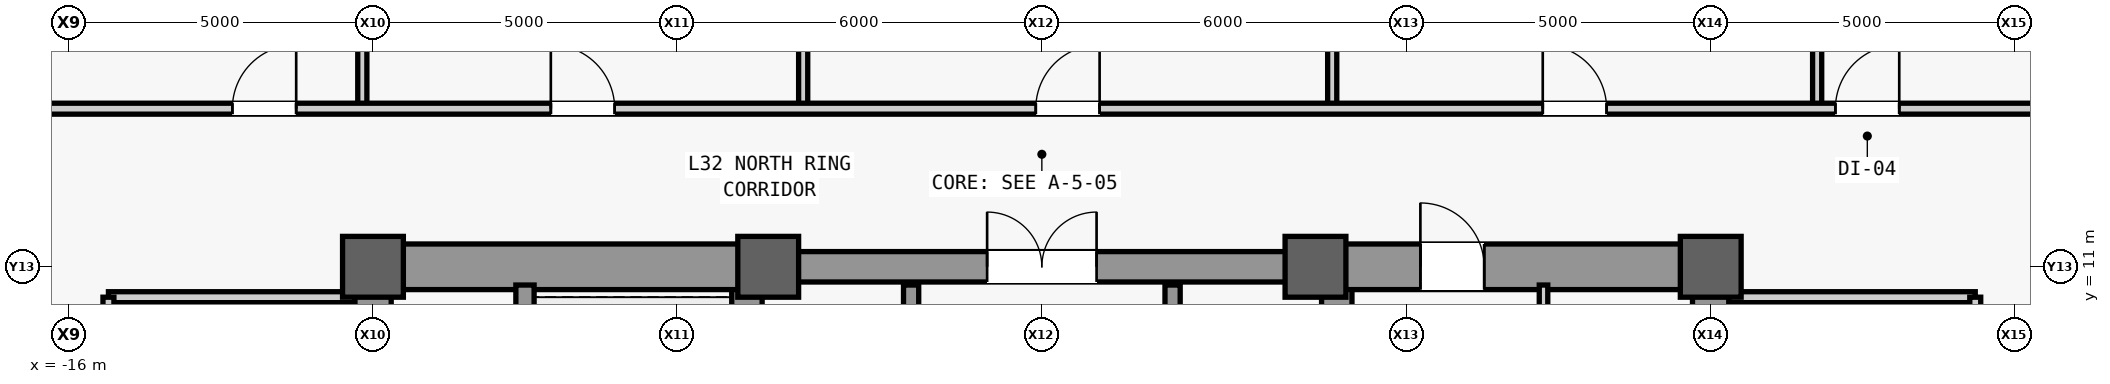
"""IFC4 building model, lengths in metres.
Left out: names, types, materials, properties, quantities, classifications, styles, units other than length and angle.
Written with IfcOpenShell. Run it as: python <this file> out.ifc"""

import sys

from ifc_helpers import new_model, si_unit, direction, frame, frame_2d, origin, origin_2d, place, context, subcontext, project, spatial, rectangle, extrude, source, transform, mapped, element, fill, save


model = new_model("IFC4")
c1 = context("Model", 3, precision=1e-05, world=origin(), true_north=direction((0.0, 1.0)))
c2 = subcontext(c1, "Body", "Model", "MODEL_VIEW")
j1 = project(units=[si_unit("LENGTHUNIT", "METRE"), si_unit("PLANEANGLEUNIT", "RADIAN")], contexts=[c1])
p1 = place(None, origin())
s1 = spatial("IfcSite", under=j1, at=p1, CompositionType="ELEMENT")
p2 = place(p1, origin())
s2 = spatial("IfcBuilding", under=s1, at=p2, CompositionType="ELEMENT")
p3 = place(p2, frame((0.0, 0.0, 140.6)))
s3 = spatial("IfcBuildingStorey", under=s2, at=p3, CompositionType="ELEMENT", Elevation=140.6)
m1 = source(origin(), c2, "Body", "SweptSolid", [
    extrude(rectangle(XDim=22.0, YDim=0.6, at=frame_2d((11.0, 0.0))), origin(), (0.0, 0.0, 1.0), 3.84),
])
p4 = place(p3, frame((-11.0, -11.0, 0.0), z_axis=(0.0, 0.0, 1.0), x_axis=(0.0, 1.0, 0.0)))
e1 = element("IfcWall", 1, at=p4, inside=s3, PredefinedType="SHEAR", context=c2, shape_type="MappedRepresentation", body=[
    mapped(m1, transform((0.0, 0.0, 0.0), scale=1.0)),
])
m2 = source(origin(), c2, "Body", "SweptSolid", [
    extrude(rectangle(XDim=1.1, YDim=2.2, at=frame_2d((0.55, 1.1))), frame((0.0, 0.31, 0.0), z_axis=(0.0, -1.0, 0.0), x_axis=(1.0, 0.0, 0.0)), (0.0, 0.0, 1.0), 0.62),
])
p5 = place(p4, frame((0.8, 0.0, 0.0)))
e2 = element("IfcOpeningElement", 2, at=p5, cuts=e1, PredefinedType="OPENING", context=c2, shape_type="MappedRepresentation", body=[
    mapped(m2, transform((0.0, 0.0, 0.0), scale=1.0)),
])
p6 = place(p4, frame((12.5, 0.0, 0.0)))
e3 = element("IfcOpeningElement", 3, at=p6, cuts=e1, PredefinedType="OPENING", context=c2, shape_type="MappedRepresentation", body=[
    mapped(m2, transform((0.0, 0.0, 0.0), scale=1.0)),
])
m3 = source(origin(), c2, "Body", "SweptSolid", [
    extrude(rectangle(XDim=0.9, YDim=2.15, at=frame_2d((0.45, 1.075))), frame((0.0, 0.31, 0.0), z_axis=(0.0, -1.0, 0.0), x_axis=(1.0, 0.0, 0.0)), (0.0, 0.0, 1.0), 0.62),
])
p7 = place(p4, frame((6.2, 0.0, 0.0)))
e4 = element("IfcOpeningElement", 4, at=p7, cuts=e1, PredefinedType="OPENING", context=c2, shape_type="MappedRepresentation", body=[
    mapped(m3, transform((0.0, 0.0, 0.0), scale=1.0)),
])
p8 = place(p4, frame((8.05, 0.0, 0.0)))
e5 = element("IfcOpeningElement", 5, at=p8, cuts=e1, PredefinedType="OPENING", context=c2, shape_type="MappedRepresentation", body=[
    mapped(m3, transform((0.0, 0.0, 0.0), scale=1.0)),
])
m4 = source(origin(), c2, "Body", "SweptSolid", [
    extrude(rectangle(XDim=1.3, YDim=2.3, at=frame_2d((0.65, 1.15))), frame((0.0, 0.31, 0.0), z_axis=(0.0, -1.0, 0.0), x_axis=(1.0, 0.0, 0.0)), (0.0, 0.0, 1.0), 0.62),
])
p9 = place(p4, frame((2.7, 0.0, 0.0)))
e6 = element("IfcOpeningElement", 6, at=p9, cuts=e1, PredefinedType="OPENING", context=c2, shape_type="MappedRepresentation", body=[
    mapped(m4, transform((0.0, 0.0, 0.0), scale=1.0)),
])
p10 = place(p3, frame((11.0, -11.0, 0.0), z_axis=(0.0, 0.0, 1.0), x_axis=(0.0, 1.0, 0.0)))
e7 = element("IfcWall", 7, at=p10, inside=s3, PredefinedType="SHEAR", context=c2, shape_type="MappedRepresentation", body=[
    mapped(m1, transform((0.0, 0.0, 0.0), scale=1.0)),
])
p11 = place(p10, frame((0.8, 0.0, 0.0)))
e8 = element("IfcOpeningElement", 8, at=p11, cuts=e7, PredefinedType="OPENING", context=c2, shape_type="MappedRepresentation", body=[
    mapped(m2, transform((0.0, 0.0, 0.0), scale=1.0)),
])
p12 = place(p10, frame((6.85, 0.0, 0.0)))
e9 = element("IfcOpeningElement", 9, at=p12, cuts=e7, PredefinedType="OPENING", context=c2, shape_type="MappedRepresentation", body=[
    mapped(m3, transform((0.0, 0.0, 0.0), scale=1.0)),
])
p13 = place(p10, frame((2.7, 0.0, 0.0)))
e10 = element("IfcOpeningElement", 10, at=p13, cuts=e7, PredefinedType="OPENING", context=c2, shape_type="MappedRepresentation", body=[
    mapped(m4, transform((0.0, 0.0, 0.0), scale=1.0)),
])
p14 = place(p10, frame((13.35, 0.0, 0.0)))
e11 = element("IfcOpeningElement", 11, at=p14, cuts=e7, PredefinedType="OPENING", context=c2, shape_type="MappedRepresentation", body=[
    mapped(m4, transform((0.0, 0.0, 0.0), scale=1.0)),
])
m5 = source(origin(), c2, "Body", "SweptSolid", [
    extrude(rectangle(XDim=21.4, YDim=0.5, at=frame_2d((10.7, 0.0))), origin(), (0.0, 0.0, 1.0), 3.84),
])
for number, where, z_axis, x_axis in (
    (12, (-4.85, -10.7, 0.0), (0.0, 0.0, 1.0), (0.0, 1.0, 0.0)),
    (13, (4.85, -10.7, 0.0), (0.0, 0.0, 1.0), (0.0, 1.0, 0.0)),
):
    element("IfcWall", number, at=place(p3, frame(where, z_axis=z_axis, x_axis=x_axis)), inside=s3, PredefinedType="SHEAR", context=c2, shape_type="MappedRepresentation", body=[
        mapped(m5, transform((0.0, 0.0, 0.0), scale=1.0)),
    ])
m6 = source(origin(), c2, "Body", "SweptSolid", [
    extrude(rectangle(XDim=5.85, YDim=0.75, at=frame_2d((2.925, 0.0))), origin(), (0.0, 0.0, 1.0), 3.84),
])
p15 = place(p3, frame((-10.7, 11.0, 0.0), z_axis=(0.0, 0.0, 1.0), x_axis=(1.0, 0.0, 0.0)))
e14 = element("IfcWall", 14, at=p15, inside=s3, PredefinedType="SHEAR", context=c2, shape_type="MappedRepresentation", body=[
    mapped(m6, transform((0.0, 0.0, 0.0), scale=1.0)),
])
p16 = place(p3, frame((4.85, 11.0, 0.0), z_axis=(0.0, 0.0, 1.0), x_axis=(1.0, 0.0, 0.0)))
e15 = element("IfcWall", 15, at=p16, inside=s3, PredefinedType="SHEAR", context=c2, shape_type="MappedRepresentation", body=[
    mapped(m6, transform((0.0, 0.0, 0.0), scale=1.0)),
])
m7 = source(origin(), c2, "Body", "SweptSolid", [
    extrude(rectangle(XDim=1.05, YDim=2.2, at=frame_2d((0.525, 1.1))), frame((0.0, 0.385, 0.0), z_axis=(0.0, -1.0, 0.0), x_axis=(1.0, 0.0, 0.0)), (0.0, 0.0, 1.0), 0.77),
])
p17 = place(p16, frame((1.375, 0.0, 0.0)))
e16 = element("IfcOpeningElement", 16, at=p17, cuts=e15, PredefinedType="OPENING", context=c2, shape_type="MappedRepresentation", body=[
    mapped(m7, transform((0.0, 0.0, 0.0), scale=1.0)),
])
m8 = source(origin(), c2, "Body", "SweptSolid", [
    extrude(rectangle(XDim=9.2, YDim=0.5, at=frame_2d((4.6, 0.0))), origin(), (0.0, 0.0, 1.0), 3.84),
])
p18 = place(p3, frame((-4.6, 11.0, 0.0), z_axis=(0.0, 0.0, 1.0), x_axis=(1.0, 0.0, 0.0)))
e17 = element("IfcWall", 17, at=p18, inside=s3, PredefinedType="SHEAR", context=c2, shape_type="MappedRepresentation", body=[
    mapped(m8, transform((0.0, 0.0, 0.0), scale=1.0)),
])
m9 = source(origin(), c2, "Body", "SweptSolid", [
    extrude(rectangle(XDim=1.8, YDim=2.25, at=frame_2d((0.9, 1.125))), frame((0.0, 0.26, 0.0), z_axis=(0.0, -1.0, 0.0), x_axis=(1.0, 0.0, 0.0)), (0.0, 0.0, 1.0), 0.52),
])
p19 = place(p18, frame((3.7, 0.0, 0.0)))
e18 = element("IfcOpeningElement", 18, at=p19, cuts=e17, PredefinedType="OPENING", context=c2, shape_type="MappedRepresentation", body=[
    mapped(m9, transform((0.0, 0.0, 0.0), scale=1.0)),
])
m10 = source(origin(), c2, "Body", "SweptSolid", [
    extrude(rectangle(XDim=1.0, YDim=1.0, at=origin_2d()), origin(), (0.0, 0.0, 1.0), 4.1),
])
for number, where, z_axis, x_axis in (
    (19, (-11.0, 11.0, 0.0), (0.0, 0.0, 1.0), (1.0, 0.0, 0.0)),
    (20, (-4.5, 11.0, 0.0), (0.0, 0.0, 1.0), (1.0, 0.0, 0.0)),
    (21, (4.5, 11.0, 0.0), (0.0, 0.0, 1.0), (1.0, 0.0, 0.0)),
    (22, (11.0, 11.0, 0.0), (0.0, 0.0, 1.0), (1.0, 0.0, 0.0)),
):
    element("IfcColumn", number, at=place(p3, frame(where, z_axis=z_axis, x_axis=x_axis)), inside=s3, PredefinedType="COLUMN", context=c2, shape_type="MappedRepresentation", body=[
        mapped(m10, transform((0.0, 0.0, 0.0), scale=1.0)),
    ])
m11 = source(origin(), c2, "Body", "SweptSolid", [
    extrude(rectangle(XDim=7.75, YDim=0.3, at=frame_2d((3.875, 0.0))), origin(), (0.0, 0.0, 1.0), 3.84),
])
p20 = place(p3, frame((-8.5, 2.95, 0.0), z_axis=(0.0, 0.0, 1.0), x_axis=(0.0, 1.0, 0.0)))
e23 = element("IfcWall", 23, at=p20, inside=s3, PredefinedType="SHEAR", context=c2, shape_type="MappedRepresentation", body=[
    mapped(m11, transform((0.0, 0.0, 0.0), scale=1.0)),
])
m12 = source(origin(), c2, "Body", "SweptSolid", [
    extrude(rectangle(XDim=9.4, YDim=0.14, at=frame_2d((4.7, 0.0))), origin(), (0.0, 0.0, 1.0), 3.84),
])
p21 = place(p3, frame((8.25, 1.3, 0.0), z_axis=(0.0, 0.0, 1.0), x_axis=(0.0, 1.0, 0.0)))
e24 = element("IfcWall", 24, at=p21, inside=s3, PredefinedType="PARTITIONING", context=c2, shape_type="MappedRepresentation", body=[
    mapped(m12, transform((0.0, 0.0, 0.0), scale=1.0)),
])
m13 = source(origin(), c2, "Body", "SweptSolid", [
    extrude(rectangle(XDim=4.05, YDim=0.18, at=frame_2d((2.025, 0.0))), origin(), (0.0, 0.0, 1.0), 3.84),
])
p22 = place(p3, frame((-15.35, 10.5, 0.0), z_axis=(0.0, 0.0, 1.0), x_axis=(1.0, 0.0, 0.0)))
e25 = element("IfcWall", 25, at=p22, inside=s3, PredefinedType="PARTITIONING", context=c2, shape_type="MappedRepresentation", body=[
    mapped(m13, transform((0.0, 0.0, 0.0), scale=1.0)),
])
m14 = source(origin(), c2, "Body", "SweptSolid", [
    extrude(rectangle(XDim=16.6, YDim=0.18, at=frame_2d((8.3, 0.0))), origin(), (0.0, 0.0, 1.0), 3.84),
])
p23 = place(p3, frame((-15.35, -6.1, 0.0), z_axis=(0.0, 0.0, 1.0), x_axis=(0.0, 1.0, 0.0)))
e26 = element("IfcWall", 26, at=p23, inside=s3, PredefinedType="PARTITIONING", context=c2, shape_type="MappedRepresentation", body=[
    mapped(m14, transform((0.0, 0.0, 0.0), scale=1.0)),
])
m15 = source(origin(), c2, "Body", "SweptSolid", [
    extrude(rectangle(XDim=1.8, YDim=2.25, at=frame_2d((0.9, 1.125))), frame((0.0, 0.1, 0.0), z_axis=(0.0, -1.0, 0.0), x_axis=(1.0, 0.0, 0.0)), (0.0, 0.0, 1.0), 0.2),
])
p24 = place(p23, frame((2.7, 0.0, 0.0)))
e27 = element("IfcOpeningElement", 27, at=p24, cuts=e26, PredefinedType="OPENING", context=c2, shape_type="MappedRepresentation", body=[
    mapped(m15, transform((0.0, 0.0, 0.0), scale=1.0)),
])
p25 = place(p23, frame((11.0, 0.0, 0.0)))
e28 = element("IfcOpeningElement", 28, at=p25, cuts=e26, PredefinedType="OPENING", context=c2, shape_type="MappedRepresentation", body=[
    mapped(m15, transform((0.0, 0.0, 0.0), scale=1.0)),
])
p26 = place(p3, frame((11.3, 10.5, 0.0), z_axis=(0.0, 0.0, 1.0), x_axis=(1.0, 0.0, 0.0)))
e29 = element("IfcWall", 29, at=p26, inside=s3, PredefinedType="PARTITIONING", context=c2, shape_type="MappedRepresentation", body=[
    mapped(m13, transform((0.0, 0.0, 0.0), scale=1.0)),
])
p27 = place(p3, frame((15.35, -6.1, 0.0), z_axis=(0.0, 0.0, 1.0), x_axis=(0.0, 1.0, 0.0)))
e30 = element("IfcWall", 30, at=p27, inside=s3, PredefinedType="PARTITIONING", context=c2, shape_type="MappedRepresentation", body=[
    mapped(m14, transform((0.0, 0.0, 0.0), scale=1.0)),
])
p28 = place(p27, frame((2.7, 0.0, 0.0)))
e31 = element("IfcOpeningElement", 31, at=p28, cuts=e30, PredefinedType="OPENING", context=c2, shape_type="MappedRepresentation", body=[
    mapped(m15, transform((0.0, 0.0, 0.0), scale=1.0)),
])
p29 = place(p27, frame((13.0, 0.0, 0.0)))
e32 = element("IfcOpeningElement", 32, at=p29, cuts=e30, PredefinedType="OPENING", context=c2, shape_type="MappedRepresentation", body=[
    mapped(m15, transform((0.0, 0.0, 0.0), scale=1.0)),
])
m16 = source(origin(), c2, "Body", "SweptSolid", [
    extrude(rectangle(XDim=5.4, YDim=0.25, at=frame_2d((2.7, 0.0))), origin(), (0.0, 0.0, 1.0), 3.84),
])
for number, where, z_axis, x_axis in (
    (33, (-2.15, 5.3, 0.0), (0.0, 0.0, 1.0), (0.0, 1.0, 0.0)),
    (34, (2.15, 5.3, 0.0), (0.0, 0.0, 1.0), (0.0, 1.0, 0.0)),
):
    element("IfcWall", number, at=place(p3, frame(where, z_axis=z_axis, x_axis=x_axis)), inside=s3, PredefinedType="SHEAR", context=c2, shape_type="MappedRepresentation", body=[
        mapped(m16, transform((0.0, 0.0, 0.0), scale=1.0)),
    ])
m17 = source(origin(), c2, "Body", "SweptSolid", [
    extrude(rectangle(XDim=18.4, YDim=0.15, at=frame_2d((9.2, 0.0))), origin(), (0.0, 0.0, 1.0), 2.987),
])
p30 = place(p3, frame((-11.175, 13.6, 0.0), z_axis=(0.0, 0.0, 1.0), x_axis=(0.0, 1.0, 0.0)))
e35 = element("IfcWall", 35, at=p30, inside=s3, PredefinedType="PARTITIONING", context=c2, shape_type="MappedRepresentation", body=[
    mapped(m17, transform((0.0, 0.0, 0.0), scale=1.0)),
])
m18 = source(origin(), c2, "Body", "SweptSolid", [
    extrude(rectangle(XDim=18.4, YDim=0.15, at=frame_2d((9.2, 0.0))), origin(), (0.0, 0.0, 1.0), 3.84),
])
for number, where, z_axis, x_axis in (
    (36, (-3.925, 13.6, 0.0), (0.0, 0.0, 1.0), (0.0, 1.0, 0.0)),
    (37, (4.775, 13.6, 0.0), (0.0, 0.0, 1.0), (0.0, 1.0, 0.0)),
    (38, (12.75, 13.6, 0.0), (0.0, 0.0, 1.0), (0.0, 1.0, 0.0)),
):
    element("IfcWall", number, at=place(p3, frame(where, z_axis=z_axis, x_axis=x_axis)), inside=s3, PredefinedType="PARTITIONING", context=c2, shape_type="MappedRepresentation", body=[
        mapped(m18, transform((0.0, 0.0, 0.0), scale=1.0)),
    ])
m19 = source(origin(), c2, "Body", "SweptSolid", [
    extrude(rectangle(XDim=36.25, YDim=0.18, at=frame_2d((18.125, 0.0))), origin(), (0.0, 0.0, 1.0), 3.84),
])
p31 = place(p3, frame((-17.7, 13.6, 0.0), z_axis=(0.0, 0.0, 1.0), x_axis=(1.0, 0.0, 0.0)))
e39 = element("IfcWall", 39, at=p31, inside=s3, PredefinedType="PARTITIONING", context=c2, shape_type="MappedRepresentation", body=[
    mapped(m19, transform((0.0, 0.0, 0.0), scale=1.0)),
])
m20 = source(origin(), c2, "Body", "SweptSolid", [
    extrude(rectangle(XDim=1.05, YDim=2.2, at=frame_2d((0.525, 1.1))), frame((0.0, 0.1, 0.0), z_axis=(0.0, -1.0, 0.0), x_axis=(1.0, 0.0, 0.0)), (0.0, 0.0, 1.0), 0.2),
])
p32 = place(p31, frame((4.387, 0.0, 0.0)))
e40 = element("IfcOpeningElement", 40, at=p32, cuts=e39, PredefinedType="OPENING", context=c2, shape_type="MappedRepresentation", body=[
    mapped(m20, transform((0.0, 0.0, 0.0), scale=1.0)),
])
p33 = place(p31, frame((9.625, 0.0, 0.0)))
e41 = element("IfcOpeningElement", 41, at=p33, cuts=e39, PredefinedType="OPENING", context=c2, shape_type="MappedRepresentation", body=[
    mapped(m20, transform((0.0, 0.0, 0.0), scale=1.0)),
])
p34 = place(p31, frame((17.6, 0.0, 0.0)))
e42 = element("IfcOpeningElement", 42, at=p34, cuts=e39, PredefinedType="OPENING", context=c2, shape_type="MappedRepresentation", body=[
    mapped(m20, transform((0.0, 0.0, 0.0), scale=1.0)),
])
p35 = place(p31, frame((25.938, 0.0, 0.0)))
e43 = element("IfcOpeningElement", 43, at=p35, cuts=e39, PredefinedType="OPENING", context=c2, shape_type="MappedRepresentation", body=[
    mapped(m20, transform((0.0, 0.0, 0.0), scale=1.0)),
])
p36 = place(p31, frame((30.75, 0.0, 0.0)))
e44 = element("IfcOpeningElement", 44, at=p36, cuts=e39, PredefinedType="OPENING", context=c2, shape_type="MappedRepresentation", body=[
    mapped(m20, transform((0.0, 0.0, 0.0), scale=1.0)),
])
m21 = source(origin(), c2, "Body", "SweptSolid", [
    extrude(rectangle(XDim=1.05, YDim=2.2, at=frame_2d((0.525, 1.1))), frame((0.0, 0.025, 0.0), z_axis=(0.0, -1.0, 0.0), x_axis=(1.0, 0.0, 0.0)), (0.0, 0.0, 1.0), 0.05),
])
p37 = place(p17, origin())
e45 = element("IfcDoor", 45, at=p37, inside=s3, OperationType="SINGLE_SWING_LEFT", PredefinedType="DOOR", context=c2, shape_type="MappedRepresentation", body=[
    mapped(m21, transform((0.0, 0.0, 0.0), scale=1.0)),
])
fill(e16, e45)
m22 = source(origin(), c2, "Body", "SweptSolid", [
    extrude(rectangle(XDim=1.8, YDim=2.25, at=frame_2d((0.9, 1.125))), frame((0.0, 0.025, 0.0), z_axis=(0.0, -1.0, 0.0), x_axis=(1.0, 0.0, 0.0)), (0.0, 0.0, 1.0), 0.05),
])
p38 = place(p19, origin())
e46 = element("IfcDoor", 46, at=p38, inside=s3, OperationType="SINGLE_SWING_RIGHT", PredefinedType="DOOR", context=c2, shape_type="MappedRepresentation", body=[
    mapped(m22, transform((0.0, 0.0, 0.0), scale=1.0)),
])
fill(e18, e46)
p39 = place(p32, origin())
e47 = element("IfcDoor", 47, at=p39, inside=s3, OperationType="SINGLE_SWING_RIGHT", PredefinedType="DOOR", context=c2, shape_type="MappedRepresentation", body=[
    mapped(m21, transform((0.0, 0.0, 0.0), scale=1.0)),
])
fill(e40, e47)
p40 = place(p33, origin())
e48 = element("IfcDoor", 48, at=p40, inside=s3, OperationType="SINGLE_SWING_LEFT", PredefinedType="DOOR", context=c2, shape_type="MappedRepresentation", body=[
    mapped(m21, transform((0.0, 0.0, 0.0), scale=1.0)),
])
fill(e41, e48)
p41 = place(p34, origin())
e49 = element("IfcDoor", 49, at=p41, inside=s3, OperationType="SINGLE_SWING_RIGHT", PredefinedType="DOOR", context=c2, shape_type="MappedRepresentation", body=[
    mapped(m21, transform((0.0, 0.0, 0.0), scale=1.0)),
])
fill(e42, e49)
p42 = place(p35, origin())
e50 = element("IfcDoor", 50, at=p42, inside=s3, OperationType="SINGLE_SWING_LEFT", PredefinedType="DOOR", context=c2, shape_type="MappedRepresentation", body=[
    mapped(m21, transform((0.0, 0.0, 0.0), scale=1.0)),
])
fill(e43, e50)
p43 = place(p36, origin())
e51 = element("IfcDoor", 51, at=p43, inside=s3, OperationType="SINGLE_SWING_RIGHT", PredefinedType="DOOR", context=c2, shape_type="MappedRepresentation", body=[
    mapped(m21, transform((0.0, 0.0, 0.0), scale=1.0)),
])
fill(e44, e51)
save(model, sys.argv[1])
